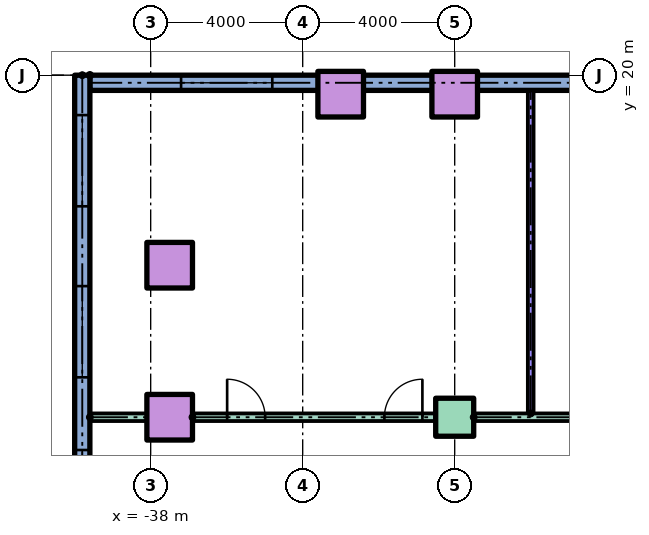
"""IFC4 building model, lengths in metres.
Left out: names, types, materials, properties, quantities, classifications, styles, units other than length and angle.
Written with IfcOpenShell. Run it as: python <this file> out.ifc"""

import sys

from ifc_helpers import new_model, si_unit, direction, frame, frame_2d, origin, origin_2d, place, context, subcontext, project, spatial, rectangle, hollow_rectangle, extrude, element, fill, save


model = new_model("IFC4")
c1 = context("Model", 3, precision=1e-05, world=origin(), true_north=direction((0.0, 1.0)))
c2 = subcontext(c1, "Body", "Model", "MODEL_VIEW")
j1 = project(units=[si_unit("LENGTHUNIT", "METRE"), si_unit("PLANEANGLEUNIT", "RADIAN")], contexts=[c1])
p1 = place(None, origin())
s1 = spatial("IfcSite", under=j1, at=p1, CompositionType="ELEMENT")
p2 = place(p1, origin())
s2 = spatial("IfcBuilding", under=s1, at=p2, CompositionType="ELEMENT")
p3 = place(p2, frame((0.0, 0.0, 18.0)))
s3 = spatial("IfcBuildingStorey", under=s2, at=p3, CompositionType="ELEMENT", Elevation=18.0)
p4 = place(p3, frame((-37.5, 11.0, 0.0)))
e1 = element("IfcColumn", 1, at=p4, inside=s3, PredefinedType="COLUMN", context=c2, shape_type="SweptSolid", body=[
    extrude(hollow_rectangle(XDim=1.2, YDim=1.2, WallThickness=0.06, at=origin_2d()), origin(), (0.0, 0.0, 1.0), 4.0),
])
p5 = place(p3, frame((-30.0, 11.0, 0.0)))
e2 = element("IfcColumn", 2, at=p5, inside=s3, PredefinedType="COLUMN", context=c2, shape_type="SweptSolid", body=[
    extrude(rectangle(XDim=1.0, YDim=1.0, at=origin_2d()), origin(), (0.0, 0.0, 1.0), 4.0),
])
for number, where in (
    (3, (-37.5, 15.0, 0.0)),
    (4, (-33.0, 19.5, 0.0)),
    (5, (-30.0, 19.5, 0.0)),
):
    element("IfcColumn", number, at=place(p3, frame(where)), inside=s3, PredefinedType="COLUMN", context=c2, shape_type="SweptSolid", body=[
        extrude(hollow_rectangle(XDim=1.2, YDim=1.2, WallThickness=0.06, at=origin_2d()), origin(), (0.0, 0.0, 1.0), 4.0),
    ])
p6 = place(p3, frame((-14.0, 19.8, 0.0), z_axis=(0.0, 0.0, 1.0), x_axis=(-1.0, 0.0, 0.0)))
e6 = element("IfcWall", 6, at=p6, inside=s3, PredefinedType="STANDARD", context=c2, shape_type="SweptSolid", body=[
    extrude(rectangle(XDim=25.6, YDim=0.4, at=frame_2d((12.8, 0.0))), origin(), (0.0, 0.0, 1.0), 3.7),
])
p7 = place(p6, frame((0.8, 0.0, 0.9)))
e7 = element("IfcOpeningElement", 7, at=p7, cuts=e6, PredefinedType="OPENING", context=c2, shape_type="SweptSolid", body=[
    extrude(rectangle(XDim=2.4, YDim=2.1, at=frame_2d((1.2, 1.05))), frame((0.0, 0.21, 0.0), z_axis=(0.0, -1.0, 0.0), x_axis=(1.0, 0.0, 0.0)), (0.0, 0.0, 1.0), 0.42),
])
p8 = place(p6, frame((9.065, 0.0, 0.9)))
e8 = element("IfcOpeningElement", 8, at=p8, cuts=e6, PredefinedType="OPENING", context=c2, shape_type="SweptSolid", body=[
    extrude(rectangle(XDim=2.4, YDim=2.1, at=frame_2d((1.2, 1.05))), frame((0.0, 0.21, 0.0), z_axis=(0.0, -1.0, 0.0), x_axis=(1.0, 0.0, 0.0)), (0.0, 0.0, 1.0), 0.42),
])
p9 = place(p6, frame((20.8, 0.0, 0.9)))
e9 = element("IfcOpeningElement", 9, at=p9, cuts=e6, PredefinedType="OPENING", context=c2, shape_type="SweptSolid", body=[
    extrude(rectangle(XDim=2.4, YDim=2.1, at=frame_2d((1.2, 1.05))), frame((0.0, 0.21, 0.0), z_axis=(0.0, -1.0, 0.0), x_axis=(1.0, 0.0, 0.0)), (0.0, 0.0, 1.0), 0.42),
])
p10 = place(p3, frame((-39.8, 20.0, 0.0), z_axis=(0.0, 0.0, 1.0), x_axis=(0.0, -1.0, 0.0)))
e10 = element("IfcWall", 10, at=p10, inside=s3, PredefinedType="STANDARD", context=c2, shape_type="SweptSolid", body=[
    extrude(rectangle(XDim=70.0, YDim=0.4, at=frame_2d((35.0, 0.0))), origin(), (0.0, 0.0, 1.0), 3.7),
])
p11 = place(p10, frame((1.05, 0.0, 0.9)))
e11 = element("IfcOpeningElement", 11, at=p11, cuts=e10, PredefinedType="OPENING", context=c2, shape_type="SweptSolid", body=[
    extrude(rectangle(XDim=2.4, YDim=2.1, at=frame_2d((1.2, 1.05))), frame((0.0, 0.21, 0.0), z_axis=(0.0, -1.0, 0.0), x_axis=(1.0, 0.0, 0.0)), (0.0, 0.0, 1.0), 0.42),
])
p12 = place(p10, frame((5.55, 0.0, 0.9)))
e12 = element("IfcOpeningElement", 12, at=p12, cuts=e10, PredefinedType="OPENING", context=c2, shape_type="SweptSolid", body=[
    extrude(rectangle(XDim=2.4, YDim=2.1, at=frame_2d((1.2, 1.05))), frame((0.0, 0.21, 0.0), z_axis=(0.0, -1.0, 0.0), x_axis=(1.0, 0.0, 0.0)), (0.0, 0.0, 1.0), 0.42),
])
p13 = place(p10, frame((9.863, 0.0, 0.9)))
e13 = element("IfcOpeningElement", 13, at=p13, cuts=e10, PredefinedType="OPENING", context=c2, shape_type="SweptSolid", body=[
    extrude(rectangle(XDim=2.4, YDim=2.1, at=frame_2d((1.2, 1.05))), frame((0.0, 0.21, 0.0), z_axis=(0.0, -1.0, 0.0), x_axis=(1.0, 0.0, 0.0)), (0.0, 0.0, 1.0), 0.42),
])
p14 = place(p10, frame((13.988, 0.0, 0.9)))
e14 = element("IfcOpeningElement", 14, at=p14, cuts=e10, PredefinedType="OPENING", context=c2, shape_type="SweptSolid", body=[
    extrude(rectangle(XDim=2.4, YDim=2.1, at=frame_2d((1.2, 1.05))), frame((0.0, 0.21, 0.0), z_axis=(0.0, -1.0, 0.0), x_axis=(1.0, 0.0, 0.0)), (0.0, 0.0, 1.0), 0.42),
])
p15 = place(p10, frame((18.113, 0.0, 0.9)))
e15 = element("IfcOpeningElement", 15, at=p15, cuts=e10, PredefinedType="OPENING", context=c2, shape_type="SweptSolid", body=[
    extrude(rectangle(XDim=2.4, YDim=2.1, at=frame_2d((1.2, 1.05))), frame((0.0, 0.21, 0.0), z_axis=(0.0, -1.0, 0.0), x_axis=(1.0, 0.0, 0.0)), (0.0, 0.0, 1.0), 0.42),
])
p16 = place(p10, frame((22.238, 0.0, 0.9)))
e16 = element("IfcOpeningElement", 16, at=p16, cuts=e10, PredefinedType="OPENING", context=c2, shape_type="SweptSolid", body=[
    extrude(rectangle(XDim=2.4, YDim=2.1, at=frame_2d((1.2, 1.05))), frame((0.0, 0.21, 0.0), z_axis=(0.0, -1.0, 0.0), x_axis=(1.0, 0.0, 0.0)), (0.0, 0.0, 1.0), 0.42),
])
p17 = place(p10, frame((26.363, 0.0, 0.9)))
e17 = element("IfcOpeningElement", 17, at=p17, cuts=e10, PredefinedType="OPENING", context=c2, shape_type="SweptSolid", body=[
    extrude(rectangle(XDim=2.4, YDim=2.1, at=frame_2d((1.2, 1.05))), frame((0.0, 0.21, 0.0), z_axis=(0.0, -1.0, 0.0), x_axis=(1.0, 0.0, 0.0)), (0.0, 0.0, 1.0), 0.42),
])
p18 = place(p10, frame((30.488, 0.0, 0.9)))
e18 = element("IfcOpeningElement", 18, at=p18, cuts=e10, PredefinedType="OPENING", context=c2, shape_type="SweptSolid", body=[
    extrude(rectangle(XDim=2.4, YDim=2.1, at=frame_2d((1.2, 1.05))), frame((0.0, 0.21, 0.0), z_axis=(0.0, -1.0, 0.0), x_axis=(1.0, 0.0, 0.0)), (0.0, 0.0, 1.0), 0.42),
])
p19 = place(p10, frame((34.613, 0.0, 0.9)))
e19 = element("IfcOpeningElement", 19, at=p19, cuts=e10, PredefinedType="OPENING", context=c2, shape_type="SweptSolid", body=[
    extrude(rectangle(XDim=2.4, YDim=2.1, at=frame_2d((1.2, 1.05))), frame((0.0, 0.21, 0.0), z_axis=(0.0, -1.0, 0.0), x_axis=(1.0, 0.0, 0.0)), (0.0, 0.0, 1.0), 0.42),
])
p20 = place(p10, frame((38.738, 0.0, 0.9)))
e20 = element("IfcOpeningElement", 20, at=p20, cuts=e10, PredefinedType="OPENING", context=c2, shape_type="SweptSolid", body=[
    extrude(rectangle(XDim=2.4, YDim=2.1, at=frame_2d((1.2, 1.05))), frame((0.0, 0.21, 0.0), z_axis=(0.0, -1.0, 0.0), x_axis=(1.0, 0.0, 0.0)), (0.0, 0.0, 1.0), 0.42),
])
p21 = place(p10, frame((54.05, 0.0, 0.9)))
e21 = element("IfcOpeningElement", 21, at=p21, cuts=e10, PredefinedType="OPENING", context=c2, shape_type="SweptSolid", body=[
    extrude(rectangle(XDim=2.4, YDim=2.1, at=frame_2d((1.2, 1.05))), frame((0.0, 0.21, 0.0), z_axis=(0.0, -1.0, 0.0), x_axis=(1.0, 0.0, 0.0)), (0.0, 0.0, 1.0), 0.42),
])
p22 = place(p10, frame((57.55, 0.0, 0.9)))
e22 = element("IfcOpeningElement", 22, at=p22, cuts=e10, PredefinedType="OPENING", context=c2, shape_type="SweptSolid", body=[
    extrude(rectangle(XDim=2.4, YDim=2.1, at=frame_2d((1.2, 1.05))), frame((0.0, 0.21, 0.0), z_axis=(0.0, -1.0, 0.0), x_axis=(1.0, 0.0, 0.0)), (0.0, 0.0, 1.0), 0.42),
])
p23 = place(p10, frame((61.05, 0.0, 0.9)))
e23 = element("IfcOpeningElement", 23, at=p23, cuts=e10, PredefinedType="OPENING", context=c2, shape_type="SweptSolid", body=[
    extrude(rectangle(XDim=2.4, YDim=2.1, at=frame_2d((1.2, 1.05))), frame((0.0, 0.21, 0.0), z_axis=(0.0, -1.0, 0.0), x_axis=(1.0, 0.0, 0.0)), (0.0, 0.0, 1.0), 0.42),
])
p24 = place(p10, frame((66.85, 0.0, 0.9)))
e24 = element("IfcOpeningElement", 24, at=p24, cuts=e10, PredefinedType="OPENING", context=c2, shape_type="SweptSolid", body=[
    extrude(rectangle(XDim=2.4, YDim=2.1, at=frame_2d((1.2, 1.05))), frame((0.0, 0.21, 0.0), z_axis=(0.0, -1.0, 0.0), x_axis=(1.0, 0.0, 0.0)), (0.0, 0.0, 1.0), 0.42),
])
p25 = place(p3, frame((-39.6, 11.0, 0.0)))
e25 = element("IfcWall", 25, at=p25, inside=s3, PredefinedType="PARTITIONING", context=c2, shape_type="SweptSolid", body=[
    extrude(rectangle(XDim=1.5, YDim=0.2, at=frame_2d((0.75, 0.0))), origin(), (0.0, 0.0, 1.0), 3.7),
])
p26 = place(p3, frame((-36.9, 11.0, 0.0)))
e26 = element("IfcWall", 26, at=p26, inside=s3, PredefinedType="PARTITIONING", context=c2, shape_type="SweptSolid", body=[
    extrude(rectangle(XDim=6.4, YDim=0.2, at=frame_2d((3.2, 0.0))), origin(), (0.0, 0.0, 1.0), 3.7),
])
p27 = place(p26, frame((0.912, 0.0, 0.0)))
e27 = element("IfcOpeningElement", 27, at=p27, cuts=e26, PredefinedType="OPENING", context=c2, shape_type="SweptSolid", body=[
    extrude(rectangle(XDim=1.0, YDim=2.1, at=frame_2d((0.5, 1.05))), frame((0.0, 0.11, 0.0), z_axis=(0.0, -1.0, 0.0), x_axis=(1.0, 0.0, 0.0)), (0.0, 0.0, 1.0), 0.22),
])
p28 = place(p26, frame((5.05, 0.0, 0.0)))
e28 = element("IfcOpeningElement", 28, at=p28, cuts=e26, PredefinedType="OPENING", context=c2, shape_type="SweptSolid", body=[
    extrude(rectangle(XDim=1.0, YDim=2.1, at=frame_2d((0.5, 1.05))), frame((0.0, 0.11, 0.0), z_axis=(0.0, -1.0, 0.0), x_axis=(1.0, 0.0, 0.0)), (0.0, 0.0, 1.0), 0.22),
])
p29 = place(p3, frame((-29.5, 11.0, 0.0)))
e29 = element("IfcWall", 29, at=p29, inside=s3, PredefinedType="PARTITIONING", context=c2, shape_type="SweptSolid", body=[
    extrude(rectangle(XDim=7.0, YDim=0.2, at=frame_2d((3.5, 0.0))), origin(), (0.0, 0.0, 1.0), 3.7),
])
p30 = place(p3, frame((-28.0, 11.1, 0.0), z_axis=(0.0, 0.0, 1.0), x_axis=(0.0, 1.0, 0.0)))
e30 = element("IfcWall", 30, at=p30, inside=s3, PredefinedType="PARTITIONING", context=c2, shape_type="SweptSolid", body=[
    extrude(rectangle(XDim=8.5, YDim=0.15, at=frame_2d((4.25, 0.0))), origin(), (0.0, 0.0, 1.0), 3.7),
])
p31 = place(p9, origin())
e31 = element("IfcWindow", 31, at=p31, inside=s3, PartitioningType="SINGLE_PANEL", PredefinedType="WINDOW", context=c2, shape_type="SweptSolid", body=[
    extrude(rectangle(XDim=2.4, YDim=2.1, at=frame_2d((1.2, 1.05))), frame((0.0, 0.03, 0.0), z_axis=(0.0, -1.0, 0.0), x_axis=(1.0, 0.0, 0.0)), (0.0, 0.0, 1.0), 0.06),
])
fill(e9, e31)
p32 = place(p11, origin())
e32 = element("IfcWindow", 32, at=p32, inside=s3, PartitioningType="SINGLE_PANEL", PredefinedType="WINDOW", context=c2, shape_type="SweptSolid", body=[
    extrude(rectangle(XDim=2.4, YDim=2.1, at=frame_2d((1.2, 1.05))), frame((0.0, 0.03, 0.0), z_axis=(0.0, -1.0, 0.0), x_axis=(1.0, 0.0, 0.0)), (0.0, 0.0, 1.0), 0.06),
])
fill(e11, e32)
p33 = place(p12, origin())
e33 = element("IfcWindow", 33, at=p33, inside=s3, PartitioningType="SINGLE_PANEL", PredefinedType="WINDOW", context=c2, shape_type="SweptSolid", body=[
    extrude(rectangle(XDim=2.4, YDim=2.1, at=frame_2d((1.2, 1.05))), frame((0.0, 0.03, 0.0), z_axis=(0.0, -1.0, 0.0), x_axis=(1.0, 0.0, 0.0)), (0.0, 0.0, 1.0), 0.06),
])
fill(e12, e33)
p34 = place(p13, origin())
e34 = element("IfcWindow", 34, at=p34, inside=s3, PartitioningType="SINGLE_PANEL", PredefinedType="WINDOW", context=c2, shape_type="SweptSolid", body=[
    extrude(rectangle(XDim=2.4, YDim=2.1, at=frame_2d((1.2, 1.05))), frame((0.0, 0.03, 0.0), z_axis=(0.0, -1.0, 0.0), x_axis=(1.0, 0.0, 0.0)), (0.0, 0.0, 1.0), 0.06),
])
fill(e13, e34)
p35 = place(p27, origin())
e35 = element("IfcDoor", 35, at=p35, inside=s3, OperationType="SINGLE_SWING_LEFT", PredefinedType="DOOR", context=c2, shape_type="SweptSolid", body=[
    extrude(rectangle(XDim=1.0, YDim=2.1, at=frame_2d((0.5, 1.05))), frame((0.0, 0.025, 0.0), z_axis=(0.0, -1.0, 0.0), x_axis=(1.0, 0.0, 0.0)), (0.0, 0.0, 1.0), 0.05),
])
fill(e27, e35)
p36 = place(p28, origin())
e36 = element("IfcDoor", 36, at=p36, inside=s3, OperationType="SINGLE_SWING_RIGHT", PredefinedType="DOOR", context=c2, shape_type="SweptSolid", body=[
    extrude(rectangle(XDim=1.0, YDim=2.1, at=frame_2d((0.5, 1.05))), frame((0.0, 0.025, 0.0), z_axis=(0.0, -1.0, 0.0), x_axis=(1.0, 0.0, 0.0)), (0.0, 0.0, 1.0), 0.05),
])
fill(e28, e36)
save(model, sys.argv[1])
